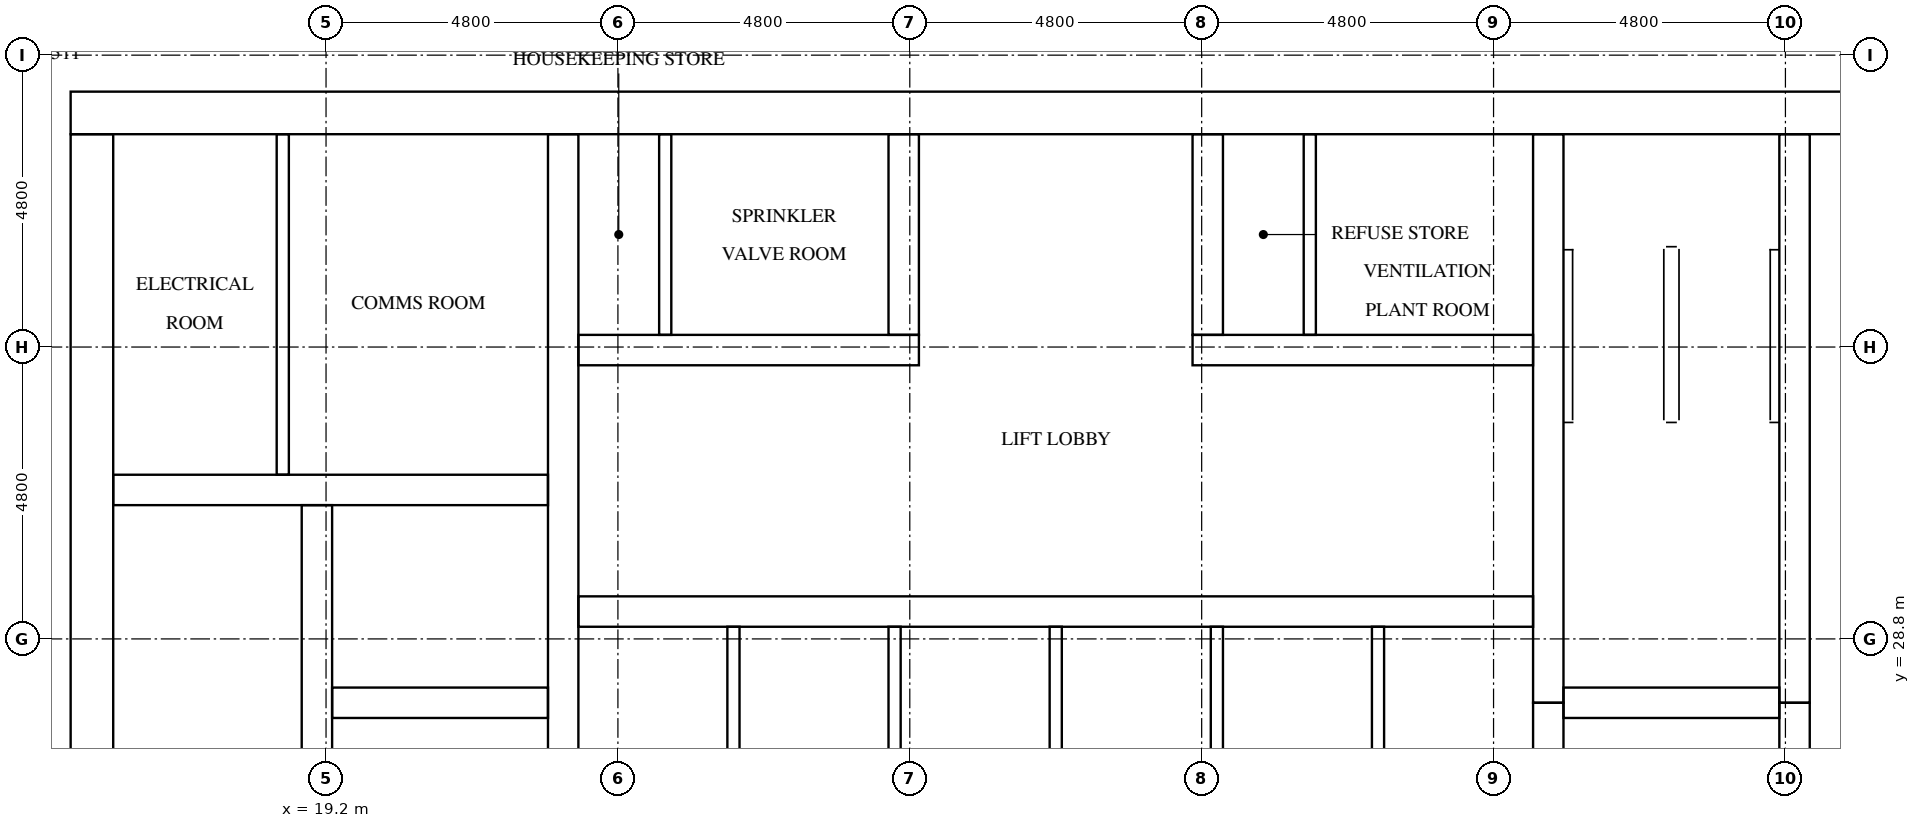
"""IFC4 building model, lengths in metres.
Left out: names, types, materials, properties, quantities, classifications, styles, units other than length and angle.
Written with IfcOpenShell. Run it as: python <this file> out.ifc"""

import sys

from ifc_helpers import new_model, si_unit, direction, frame, frame_2d, origin, place, context, subcontext, project, spatial, rectangle, extrude, element, fill, save


model = new_model("IFC4")
c1 = context("Model", 3, precision=1e-05, world=origin(), true_north=direction((0.0, 1.0)))
c2 = subcontext(c1, "Body", "Model", "MODEL_VIEW")
j1 = project(units=[si_unit("LENGTHUNIT", "METRE"), si_unit("PLANEANGLEUNIT", "RADIAN")], contexts=[c1])
p1 = place(None, origin())
s1 = spatial("IfcSite", under=j1, at=p1, CompositionType="ELEMENT")
p2 = place(p1, origin())
s2 = spatial("IfcBuilding", under=s1, at=p2, CompositionType="ELEMENT")
p3 = place(p2, frame((0.0, 0.0, 212.3)))
s3 = spatial("IfcBuildingStorey", under=s2, at=p3, CompositionType="ELEMENT", Elevation=212.3)
p4 = place(p3, frame((15.0, 37.45, 0.0), z_axis=(0.0, 0.0, 1.0), x_axis=(1.0, 0.0, 0.0)))
e1 = element("IfcWall", 1, at=p4, inside=s3, PredefinedType="SHEAR", context=c2, shape_type="SweptSolid", body=[
    extrude(rectangle(XDim=32.4, YDim=0.7, at=frame_2d((16.2, 0.0))), origin(), (0.0, 0.0, 1.0), 3.2),
])
p5 = place(p4, frame((15.3, 0.0, 0.0)))
e2 = element("IfcOpeningElement", 2, at=p5, cuts=e1, PredefinedType="OPENING", context=c2, shape_type="SweptSolid", body=[
    extrude(rectangle(XDim=1.8, YDim=2.1, at=frame_2d((0.9, 1.05))), frame((0.0, 0.36, 0.0), z_axis=(0.0, -1.0, 0.0), x_axis=(1.0, 0.0, 0.0)), (0.0, 0.0, 1.0), 0.72),
])
p6 = place(p4, frame((1.544, 0.0, 0.0)))
e3 = element("IfcOpeningElement", 3, at=p6, cuts=e1, PredefinedType="OPENING", context=c2, shape_type="SweptSolid", body=[
    extrude(rectangle(XDim=1.0, YDim=2.1, at=frame_2d((0.5, 1.05))), frame((0.0, 0.36, 0.0), z_axis=(0.0, -1.0, 0.0), x_axis=(1.0, 0.0, 0.0)), (0.0, 0.0, 1.0), 0.72),
])
p7 = place(p4, frame((5.219, 0.0, 0.0)))
e4 = element("IfcOpeningElement", 4, at=p7, cuts=e1, PredefinedType="OPENING", context=c2, shape_type="SweptSolid", body=[
    extrude(rectangle(XDim=1.0, YDim=2.1, at=frame_2d((0.5, 1.05))), frame((0.0, 0.36, 0.0), z_axis=(0.0, -1.0, 0.0), x_axis=(1.0, 0.0, 0.0)), (0.0, 0.0, 1.0), 0.72),
])
p8 = place(p3, frame((15.35, 15.7, 0.0), z_axis=(0.0, 0.0, 1.0), x_axis=(0.0, 1.0, 0.0)))
e5 = element("IfcWall", 5, at=p8, inside=s3, PredefinedType="SHEAR", context=c2, shape_type="SweptSolid", body=[
    extrude(rectangle(XDim=21.4, YDim=0.7, at=frame_2d((10.7, 0.0))), origin(), (0.0, 0.0, 1.0), 3.2),
])
p9 = place(p8, frame((5.06, 0.0, 0.0)))
e6 = element("IfcOpeningElement", 6, at=p9, cuts=e5, PredefinedType="OPENING", context=c2, shape_type="SweptSolid", body=[
    extrude(rectangle(XDim=1.2, YDim=2.1, at=frame_2d((0.6, 1.05))), frame((0.0, 0.36, 0.0), z_axis=(0.0, -1.0, 0.0), x_axis=(1.0, 0.0, 0.0)), (0.0, 0.0, 1.0), 0.72),
])
p10 = place(p3, frame((19.05, 15.7, 0.0), z_axis=(0.0, 0.0, 1.0), x_axis=(0.0, 1.0, 0.0)))
e7 = element("IfcWall", 7, at=p10, inside=s3, PredefinedType="SHEAR", context=c2, shape_type="SweptSolid", body=[
    extrude(rectangle(XDim=15.3, YDim=0.5, at=frame_2d((7.65, 0.0))), origin(), (0.0, 0.0, 1.0), 3.2),
])
p11 = place(p10, frame((9.75, 0.0, 0.0)))
e8 = element("IfcOpeningElement", 8, at=p11, cuts=e7, PredefinedType="OPENING", context=c2, shape_type="SweptSolid", body=[
    extrude(rectangle(XDim=1.1, YDim=2.1, at=frame_2d((0.55, 1.05))), frame((0.0, 0.26, 0.0), z_axis=(0.0, -1.0, 0.0), x_axis=(1.0, 0.0, 0.0)), (0.0, 0.0, 1.0), 0.52),
])
p12 = place(p10, frame((13.25, 0.0, 0.0)))
e9 = element("IfcOpeningElement", 9, at=p12, cuts=e7, PredefinedType="OPENING", context=c2, shape_type="SweptSolid", body=[
    extrude(rectangle(XDim=1.1, YDim=2.1, at=frame_2d((0.55, 1.05))), frame((0.0, 0.26, 0.0), z_axis=(0.0, -1.0, 0.0), x_axis=(1.0, 0.0, 0.0)), (0.0, 0.0, 1.0), 0.52),
])
p13 = place(p10, frame((0.5, 0.0, 0.0)))
e10 = element("IfcOpeningElement", 10, at=p13, cuts=e7, PredefinedType="OPENING", context=c2, shape_type="SweptSolid", body=[
    extrude(rectangle(XDim=1.2, YDim=2.1, at=frame_2d((0.6, 1.05))), frame((0.0, 0.26, 0.0), z_axis=(0.0, -1.0, 0.0), x_axis=(1.0, 0.0, 0.0)), (0.0, 0.0, 1.0), 0.52),
])
p14 = place(p3, frame((23.1, 15.7, 0.0), z_axis=(0.0, 0.0, 1.0), x_axis=(0.0, 1.0, 0.0)))
e11 = element("IfcWall", 11, at=p14, inside=s3, PredefinedType="SHEAR", context=c2, shape_type="SweptSolid", body=[
    extrude(rectangle(XDim=21.4, YDim=0.5, at=frame_2d((10.7, 0.0))), origin(), (0.0, 0.0, 1.0), 3.2),
])
p15 = place(p3, frame((39.3, 24.25, 0.0), z_axis=(0.0, 0.0, 1.0), x_axis=(0.0, 1.0, 0.0)))
e12 = element("IfcWall", 12, at=p15, inside=s3, PredefinedType="SHEAR", context=c2, shape_type="SweptSolid", body=[
    extrude(rectangle(XDim=3.5, YDim=0.5, at=frame_2d((1.75, 0.0))), origin(), (0.0, 0.0, 1.0), 3.2),
])
p16 = place(p3, frame((39.3, 27.75, 0.0), z_axis=(0.0, 0.0, 1.0), x_axis=(0.0, 1.0, 0.0)))
e13 = element("IfcWall", 13, at=p16, inside=s3, PredefinedType="SHEAR", context=c2, shape_type="SweptSolid", body=[
    extrude(rectangle(XDim=9.35, YDim=0.5, at=frame_2d((4.675, 0.0))), origin(), (0.0, 0.0, 1.0), 3.2),
])
p17 = place(p3, frame((43.35, 24.25, 0.0), z_axis=(0.0, 0.0, 1.0), x_axis=(0.0, 1.0, 0.0)))
e14 = element("IfcWall", 14, at=p17, inside=s3, PredefinedType="SHEAR", context=c2, shape_type="SweptSolid", body=[
    extrude(rectangle(XDim=3.5, YDim=0.5, at=frame_2d((1.75, 0.0))), origin(), (0.0, 0.0, 1.0), 3.2),
])
p18 = place(p17, frame((1.2, 0.0, 0.0)))
e15 = element("IfcOpeningElement", 15, at=p18, cuts=e14, PredefinedType="OPENING", context=c2, shape_type="SweptSolid", body=[
    extrude(rectangle(XDim=1.1, YDim=2.1, at=frame_2d((0.55, 1.05))), frame((0.0, 0.26, 0.0), z_axis=(0.0, -1.0, 0.0), x_axis=(1.0, 0.0, 0.0)), (0.0, 0.0, 1.0), 0.52),
])
p19 = place(p3, frame((43.35, 27.75, 0.0), z_axis=(0.0, 0.0, 1.0), x_axis=(0.0, 1.0, 0.0)))
e16 = element("IfcWall", 16, at=p19, inside=s3, PredefinedType="SHEAR", context=c2, shape_type="SweptSolid", body=[
    extrude(rectangle(XDim=9.35, YDim=0.5, at=frame_2d((4.675, 0.0))), origin(), (0.0, 0.0, 1.0), 3.2),
])
p20 = place(p19, frame((7.65, 0.0, 0.0)))
e17 = element("IfcOpeningElement", 17, at=p20, cuts=e16, PredefinedType="OPENING", context=c2, shape_type="SweptSolid", body=[
    extrude(rectangle(XDim=1.2, YDim=2.1, at=frame_2d((0.6, 1.05))), frame((0.0, 0.26, 0.0), z_axis=(0.0, -1.0, 0.0), x_axis=(1.0, 0.0, 0.0)), (0.0, 0.0, 1.0), 0.52),
])
p21 = place(p3, frame((19.3, 27.75, 0.0), z_axis=(0.0, 0.0, 1.0), x_axis=(1.0, 0.0, 0.0)))
e18 = element("IfcWall", 18, at=p21, inside=s3, PredefinedType="SHEAR", context=c2, shape_type="SweptSolid", body=[
    extrude(rectangle(XDim=3.55, YDim=0.5, at=frame_2d((1.775, 0.0))), origin(), (0.0, 0.0, 1.0), 3.2),
])
p22 = place(p3, frame((15.7, 31.25, 0.0), z_axis=(0.0, 0.0, 1.0), x_axis=(1.0, 0.0, 0.0)))
e19 = element("IfcWall", 19, at=p22, inside=s3, PredefinedType="SHEAR", context=c2, shape_type="SweptSolid", body=[
    extrude(rectangle(XDim=7.15, YDim=0.5, at=frame_2d((3.575, 0.0))), origin(), (0.0, 0.0, 1.0), 3.2),
])
p23 = place(p3, frame((39.55, 27.75, 0.0), z_axis=(0.0, 0.0, 1.0), x_axis=(1.0, 0.0, 0.0)))
e20 = element("IfcWall", 20, at=p23, inside=s3, PredefinedType="SHEAR", context=c2, shape_type="SweptSolid", body=[
    extrude(rectangle(XDim=3.55, YDim=0.5, at=frame_2d((1.775, 0.0))), origin(), (0.0, 0.0, 1.0), 3.2),
])
p24 = place(p3, frame((23.35, 29.25, 0.0), z_axis=(0.0, 0.0, 1.0), x_axis=(1.0, 0.0, 0.0)))
e21 = element("IfcWall", 21, at=p24, inside=s3, PredefinedType="SHEAR", context=c2, shape_type="SweptSolid", body=[
    extrude(rectangle(XDim=15.7, YDim=0.5, at=frame_2d((7.85, 0.0))), origin(), (0.0, 0.0, 1.0), 3.2),
])
p25 = place(p24, frame((0.675, 0.0, 0.0)))
e22 = element("IfcOpeningElement", 22, at=p25, cuts=e21, PredefinedType="OPENING", context=c2, shape_type="SweptSolid", body=[
    extrude(rectangle(XDim=1.1, YDim=2.1, at=frame_2d((0.55, 1.05))), frame((0.0, 0.26, 0.0), z_axis=(0.0, -1.0, 0.0), x_axis=(1.0, 0.0, 0.0)), (0.0, 0.0, 1.0), 0.52),
])
p26 = place(p24, frame((3.325, 0.0, 0.0)))
e23 = element("IfcOpeningElement", 23, at=p26, cuts=e21, PredefinedType="OPENING", context=c2, shape_type="SweptSolid", body=[
    extrude(rectangle(XDim=1.1, YDim=2.1, at=frame_2d((0.55, 1.05))), frame((0.0, 0.26, 0.0), z_axis=(0.0, -1.0, 0.0), x_axis=(1.0, 0.0, 0.0)), (0.0, 0.0, 1.0), 0.52),
])
p27 = place(p24, frame((5.975, 0.0, 0.0)))
e24 = element("IfcOpeningElement", 24, at=p27, cuts=e21, PredefinedType="OPENING", context=c2, shape_type="SweptSolid", body=[
    extrude(rectangle(XDim=1.1, YDim=2.1, at=frame_2d((0.55, 1.05))), frame((0.0, 0.26, 0.0), z_axis=(0.0, -1.0, 0.0), x_axis=(1.0, 0.0, 0.0)), (0.0, 0.0, 1.0), 0.52),
])
p28 = place(p24, frame((8.625, 0.0, 0.0)))
e25 = element("IfcOpeningElement", 25, at=p28, cuts=e21, PredefinedType="OPENING", context=c2, shape_type="SweptSolid", body=[
    extrude(rectangle(XDim=1.1, YDim=2.1, at=frame_2d((0.55, 1.05))), frame((0.0, 0.26, 0.0), z_axis=(0.0, -1.0, 0.0), x_axis=(1.0, 0.0, 0.0)), (0.0, 0.0, 1.0), 0.52),
])
p29 = place(p24, frame((11.275, 0.0, 0.0)))
e26 = element("IfcOpeningElement", 26, at=p29, cuts=e21, PredefinedType="OPENING", context=c2, shape_type="SweptSolid", body=[
    extrude(rectangle(XDim=1.1, YDim=2.1, at=frame_2d((0.55, 1.05))), frame((0.0, 0.26, 0.0), z_axis=(0.0, -1.0, 0.0), x_axis=(1.0, 0.0, 0.0)), (0.0, 0.0, 1.0), 0.52),
])
p30 = place(p24, frame((13.925, 0.0, 0.0)))
e27 = element("IfcOpeningElement", 27, at=p30, cuts=e21, PredefinedType="OPENING", context=c2, shape_type="SweptSolid", body=[
    extrude(rectangle(XDim=1.1, YDim=2.1, at=frame_2d((0.55, 1.05))), frame((0.0, 0.26, 0.0), z_axis=(0.0, -1.0, 0.0), x_axis=(1.0, 0.0, 0.0)), (0.0, 0.0, 1.0), 0.52),
])
p31 = place(p3, frame((23.35, 33.55, 0.0), z_axis=(0.0, 0.0, 1.0), x_axis=(1.0, 0.0, 0.0)))
e28 = element("IfcWall", 28, at=p31, inside=s3, PredefinedType="SHEAR", context=c2, shape_type="SweptSolid", body=[
    extrude(rectangle(XDim=5.6, YDim=0.5, at=frame_2d((2.8, 0.0))), origin(), (0.0, 0.0, 1.0), 3.2),
])
p32 = place(p31, frame((0.164, 0.0, 0.0)))
e29 = element("IfcOpeningElement", 29, at=p32, cuts=e28, PredefinedType="OPENING", context=c2, shape_type="SweptSolid", body=[
    extrude(rectangle(XDim=1.0, YDim=2.1, at=frame_2d((0.5, 1.05))), frame((0.0, 0.26, 0.0), z_axis=(0.0, -1.0, 0.0), x_axis=(1.0, 0.0, 0.0)), (0.0, 0.0, 1.0), 0.52),
])
p33 = place(p31, frame((2.814, 0.0, 0.0)))
e30 = element("IfcOpeningElement", 30, at=p33, cuts=e28, PredefinedType="OPENING", context=c2, shape_type="SweptSolid", body=[
    extrude(rectangle(XDim=1.0, YDim=2.1, at=frame_2d((0.5, 1.05))), frame((0.0, 0.26, 0.0), z_axis=(0.0, -1.0, 0.0), x_axis=(1.0, 0.0, 0.0)), (0.0, 0.0, 1.0), 0.52),
])
p34 = place(p3, frame((33.45, 33.55, 0.0), z_axis=(0.0, 0.0, 1.0), x_axis=(1.0, 0.0, 0.0)))
e31 = element("IfcWall", 31, at=p34, inside=s3, PredefinedType="SHEAR", context=c2, shape_type="SweptSolid", body=[
    extrude(rectangle(XDim=5.6, YDim=0.5, at=frame_2d((2.8, 0.0))), origin(), (0.0, 0.0, 1.0), 3.2),
])
p35 = place(p34, frame((0.664, 0.0, 0.0)))
e32 = element("IfcOpeningElement", 32, at=p35, cuts=e31, PredefinedType="OPENING", context=c2, shape_type="SweptSolid", body=[
    extrude(rectangle(XDim=1.0, YDim=2.1, at=frame_2d((0.5, 1.05))), frame((0.0, 0.26, 0.0), z_axis=(0.0, -1.0, 0.0), x_axis=(1.0, 0.0, 0.0)), (0.0, 0.0, 1.0), 0.52),
])
p36 = place(p34, frame((3.314, 0.0, 0.0)))
e33 = element("IfcOpeningElement", 33, at=p36, cuts=e31, PredefinedType="OPENING", context=c2, shape_type="SweptSolid", body=[
    extrude(rectangle(XDim=1.0, YDim=2.1, at=frame_2d((0.5, 1.05))), frame((0.0, 0.26, 0.0), z_axis=(0.0, -1.0, 0.0), x_axis=(1.0, 0.0, 0.0)), (0.0, 0.0, 1.0), 0.52),
])
for number, where, z_axis, x_axis in (
    (34, (28.7, 33.8, 0.0), (0.0, 0.0, 1.0), (0.0, 1.0, 0.0)),
    (35, (33.7, 33.8, 0.0), (0.0, 0.0, 1.0), (0.0, 1.0, 0.0)),
):
    element("IfcWall", number, at=place(p3, frame(where, z_axis=z_axis, x_axis=x_axis)), inside=s3, PredefinedType="SHEAR", context=c2, shape_type="SweptSolid", body=[
        extrude(rectangle(XDim=3.3, YDim=0.5, at=frame_2d((1.65, 0.0))), origin(), (0.0, 0.0, 1.0), 3.2),
    ])
for number, where, z_axis, x_axis in (
    (36, (25.9, 26.4, 0.0), (0.0, 0.0, 1.0), (0.0, 1.0, 0.0)),
    (37, (28.55, 26.4, 0.0), (0.0, 0.0, 1.0), (0.0, 1.0, 0.0)),
    (38, (31.2, 26.4, 0.0), (0.0, 0.0, 1.0), (0.0, 1.0, 0.0)),
    (39, (33.85, 26.4, 0.0), (0.0, 0.0, 1.0), (0.0, 1.0, 0.0)),
    (40, (36.5, 26.4, 0.0), (0.0, 0.0, 1.0), (0.0, 1.0, 0.0)),
):
    element("IfcWall", number, at=place(p3, frame(where, z_axis=z_axis, x_axis=x_axis)), inside=s3, PredefinedType="SOLIDWALL", context=c2, shape_type="SweptSolid", body=[
        extrude(rectangle(XDim=2.6, YDim=0.2, at=frame_2d((1.3, 0.0))), origin(), (0.0, 0.0, 1.0), 3.2),
    ])
p37 = place(p3, frame((18.489, 31.5, 0.0), z_axis=(0.0, 0.0, 1.0), x_axis=(0.0, 1.0, 0.0)))
e41 = element("IfcWall", 41, at=p37, inside=s3, PredefinedType="PARTITIONING", context=c2, shape_type="SweptSolid", body=[
    extrude(rectangle(XDim=5.6, YDim=0.2, at=frame_2d((2.8, 0.0))), origin(), (0.0, 0.0, 1.0), 3.2),
])
for number, where, z_axis, x_axis in (
    (42, (24.778, 33.8, 0.0), (0.0, 0.0, 1.0), (0.0, 1.0, 0.0)),
    (43, (35.378, 33.8, 0.0), (0.0, 0.0, 1.0), (0.0, 1.0, 0.0)),
):
    element("IfcWall", number, at=place(p3, frame(where, z_axis=z_axis, x_axis=x_axis)), inside=s3, PredefinedType="PARTITIONING", context=c2, shape_type="SweptSolid", body=[
        extrude(rectangle(XDim=3.3, YDim=0.2, at=frame_2d((1.65, 0.0))), origin(), (0.0, 0.0, 1.0), 3.2),
    ])
p38 = place(p25, origin())
e44 = element("IfcDoor", 44, at=p38, inside=s3, OperationType="DOUBLE_DOOR_SLIDING", PredefinedType="DOOR", context=c2, shape_type="SweptSolid", body=[
    extrude(rectangle(XDim=1.1, YDim=2.1, at=frame_2d((0.55, 1.05))), frame((0.0, 0.025, 0.0), z_axis=(0.0, -1.0, 0.0), x_axis=(1.0, 0.0, 0.0)), (0.0, 0.0, 1.0), 0.05),
])
fill(e22, e44)
p39 = place(p26, origin())
e45 = element("IfcDoor", 45, at=p39, inside=s3, OperationType="DOUBLE_DOOR_SLIDING", PredefinedType="DOOR", context=c2, shape_type="SweptSolid", body=[
    extrude(rectangle(XDim=1.1, YDim=2.1, at=frame_2d((0.55, 1.05))), frame((0.0, 0.025, 0.0), z_axis=(0.0, -1.0, 0.0), x_axis=(1.0, 0.0, 0.0)), (0.0, 0.0, 1.0), 0.05),
])
fill(e23, e45)
p40 = place(p27, origin())
e46 = element("IfcDoor", 46, at=p40, inside=s3, OperationType="DOUBLE_DOOR_SLIDING", PredefinedType="DOOR", context=c2, shape_type="SweptSolid", body=[
    extrude(rectangle(XDim=1.1, YDim=2.1, at=frame_2d((0.55, 1.05))), frame((0.0, 0.025, 0.0), z_axis=(0.0, -1.0, 0.0), x_axis=(1.0, 0.0, 0.0)), (0.0, 0.0, 1.0), 0.05),
])
fill(e24, e46)
p41 = place(p28, origin())
e47 = element("IfcDoor", 47, at=p41, inside=s3, OperationType="DOUBLE_DOOR_SLIDING", PredefinedType="DOOR", context=c2, shape_type="SweptSolid", body=[
    extrude(rectangle(XDim=1.1, YDim=2.1, at=frame_2d((0.55, 1.05))), frame((0.0, 0.025, 0.0), z_axis=(0.0, -1.0, 0.0), x_axis=(1.0, 0.0, 0.0)), (0.0, 0.0, 1.0), 0.05),
])
fill(e25, e47)
p42 = place(p29, origin())
e48 = element("IfcDoor", 48, at=p42, inside=s3, OperationType="DOUBLE_DOOR_SLIDING", PredefinedType="DOOR", context=c2, shape_type="SweptSolid", body=[
    extrude(rectangle(XDim=1.1, YDim=2.1, at=frame_2d((0.55, 1.05))), frame((0.0, 0.025, 0.0), z_axis=(0.0, -1.0, 0.0), x_axis=(1.0, 0.0, 0.0)), (0.0, 0.0, 1.0), 0.05),
])
fill(e26, e48)
p43 = place(p30, origin())
e49 = element("IfcDoor", 49, at=p43, inside=s3, OperationType="DOUBLE_DOOR_SLIDING", PredefinedType="DOOR", context=c2, shape_type="SweptSolid", body=[
    extrude(rectangle(XDim=1.1, YDim=2.1, at=frame_2d((0.55, 1.05))), frame((0.0, 0.025, 0.0), z_axis=(0.0, -1.0, 0.0), x_axis=(1.0, 0.0, 0.0)), (0.0, 0.0, 1.0), 0.05),
])
fill(e27, e49)
p44 = place(p12, origin())
e50 = element("IfcDoor", 50, at=p44, inside=s3, OperationType="DOUBLE_DOOR_SLIDING", PredefinedType="DOOR", context=c2, shape_type="SweptSolid", body=[
    extrude(rectangle(XDim=1.1, YDim=2.1, at=frame_2d((0.55, 1.05))), frame((0.0, 0.025, 0.0), z_axis=(0.0, -1.0, 0.0), x_axis=(1.0, 0.0, 0.0)), (0.0, 0.0, 1.0), 0.05),
])
fill(e9, e50)
p45 = place(p20, origin())
e51 = element("IfcDoor", 51, at=p45, inside=s3, OperationType="SINGLE_SWING_LEFT", PredefinedType="DOOR", context=c2, shape_type="SweptSolid", body=[
    extrude(rectangle(XDim=1.2, YDim=2.1, at=frame_2d((0.6, 1.05))), frame((0.0, 0.025, 0.0), z_axis=(0.0, -1.0, 0.0), x_axis=(1.0, 0.0, 0.0)), (0.0, 0.0, 1.0), 0.05),
])
fill(e17, e51)
p46 = place(p5, origin())
e52 = element("IfcDoor", 52, at=p46, inside=s3, OperationType="DOUBLE_DOOR_SINGLE_SWING", PredefinedType="DOOR", context=c2, shape_type="SweptSolid", body=[
    extrude(rectangle(XDim=1.8, YDim=2.1, at=frame_2d((0.9, 1.05))), frame((0.0, 0.025, 0.0), z_axis=(0.0, -1.0, 0.0), x_axis=(1.0, 0.0, 0.0)), (0.0, 0.0, 1.0), 0.05),
])
fill(e2, e52)
p47 = place(p6, origin())
e53 = element("IfcDoor", 53, at=p47, inside=s3, OperationType="SINGLE_SWING_RIGHT", PredefinedType="DOOR", context=c2, shape_type="SweptSolid", body=[
    extrude(rectangle(XDim=1.0, YDim=2.1, at=frame_2d((0.5, 1.05))), frame((0.0, 0.025, 0.0), z_axis=(0.0, -1.0, 0.0), x_axis=(1.0, 0.0, 0.0)), (0.0, 0.0, 1.0), 0.05),
])
fill(e3, e53)
p48 = place(p7, origin())
e54 = element("IfcDoor", 54, at=p48, inside=s3, OperationType="SINGLE_SWING_LEFT", PredefinedType="DOOR", context=c2, shape_type="SweptSolid", body=[
    extrude(rectangle(XDim=1.0, YDim=2.1, at=frame_2d((0.5, 1.05))), frame((0.0, 0.025, 0.0), z_axis=(0.0, -1.0, 0.0), x_axis=(1.0, 0.0, 0.0)), (0.0, 0.0, 1.0), 0.05),
])
fill(e4, e54)
p49 = place(p32, frame((1.0, 0.0, 0.0), z_axis=(0.0, 0.0, 1.0), x_axis=(-1.0, 0.0, 0.0)))
e55 = element("IfcDoor", 55, at=p49, inside=s3, OperationType="SINGLE_SWING_RIGHT", PredefinedType="DOOR", context=c2, shape_type="SweptSolid", body=[
    extrude(rectangle(XDim=1.0, YDim=2.1, at=frame_2d((0.5, 1.05))), frame((0.0, 0.025, 0.0), z_axis=(0.0, -1.0, 0.0), x_axis=(1.0, 0.0, 0.0)), (0.0, 0.0, 1.0), 0.05),
])
fill(e29, e55)
p50 = place(p33, frame((1.0, 0.0, 0.0), z_axis=(0.0, 0.0, 1.0), x_axis=(-1.0, 0.0, 0.0)))
e56 = element("IfcDoor", 56, at=p50, inside=s3, OperationType="SINGLE_SWING_LEFT", PredefinedType="DOOR", context=c2, shape_type="SweptSolid", body=[
    extrude(rectangle(XDim=1.0, YDim=2.1, at=frame_2d((0.5, 1.05))), frame((0.0, 0.025, 0.0), z_axis=(0.0, -1.0, 0.0), x_axis=(1.0, 0.0, 0.0)), (0.0, 0.0, 1.0), 0.05),
])
fill(e30, e56)
p51 = place(p35, frame((1.0, 0.0, 0.0), z_axis=(0.0, 0.0, 1.0), x_axis=(-1.0, 0.0, 0.0)))
e57 = element("IfcDoor", 57, at=p51, inside=s3, OperationType="SINGLE_SWING_RIGHT", PredefinedType="DOOR", context=c2, shape_type="SweptSolid", body=[
    extrude(rectangle(XDim=1.0, YDim=2.1, at=frame_2d((0.5, 1.05))), frame((0.0, 0.025, 0.0), z_axis=(0.0, -1.0, 0.0), x_axis=(1.0, 0.0, 0.0)), (0.0, 0.0, 1.0), 0.05),
])
fill(e32, e57)
p52 = place(p36, frame((1.0, 0.0, 0.0), z_axis=(0.0, 0.0, 1.0), x_axis=(-1.0, 0.0, 0.0)))
e58 = element("IfcDoor", 58, at=p52, inside=s3, OperationType="SINGLE_SWING_LEFT", PredefinedType="DOOR", context=c2, shape_type="SweptSolid", body=[
    extrude(rectangle(XDim=1.0, YDim=2.1, at=frame_2d((0.5, 1.05))), frame((0.0, 0.025, 0.0), z_axis=(0.0, -1.0, 0.0), x_axis=(1.0, 0.0, 0.0)), (0.0, 0.0, 1.0), 0.05),
])
fill(e33, e58)
save(model, sys.argv[1])
